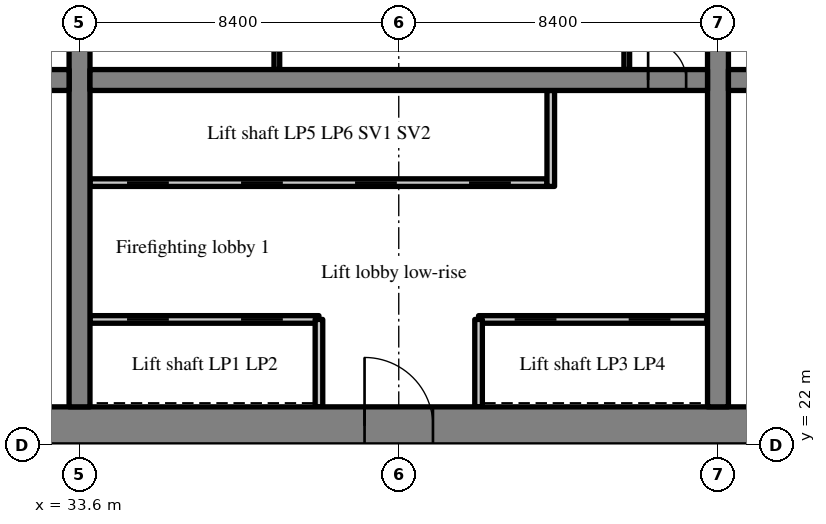
"""IFC4 building model, lengths in metres.
Left out: names, types, materials, properties, quantities, classifications, styles, units other than length and angle.
Written with IfcOpenShell. Run it as: python <this file> out.ifc"""

import sys

from ifc_helpers import new_model, si_unit, direction, frame, frame_2d, origin, place, context, subcontext, project, spatial, rectangle, extrude, source, transform, mapped, element, fill, save


model = new_model("IFC4")
c1 = context("Model", 3, precision=1e-05, world=origin(), true_north=direction((0.0, 1.0)))
c2 = subcontext(c1, "Body", "Model", "MODEL_VIEW")
j1 = project(units=[si_unit("LENGTHUNIT", "METRE"), si_unit("PLANEANGLEUNIT", "RADIAN")], contexts=[c1])
p1 = place(None, origin())
s1 = spatial("IfcSite", under=j1, at=p1, CompositionType="ELEMENT")
p2 = place(p1, origin())
s2 = spatial("IfcBuilding", under=s1, at=p2, CompositionType="ELEMENT")
p3 = place(p2, frame((0.0, 0.0, 58.2)))
s3 = spatial("IfcBuildingStorey", under=s2, at=p3, CompositionType="ELEMENT", Elevation=58.2)
m1 = source(origin(), c2, "Body", "SweptSolid", [
    extrude(rectangle(XDim=50.4, YDim=1.0, at=frame_2d((25.2, 0.0))), origin(), (0.0, 0.0, 1.0), 3.52),
])
p4 = place(p3, frame((25.2, 22.5, 0.0), z_axis=(0.0, 0.0, 1.0), x_axis=(1.0, 0.0, 0.0)))
e1 = element("IfcWall", 1, at=p4, inside=s3, PredefinedType="SHEAR", context=c2, shape_type="MappedRepresentation", body=[
    mapped(m1, transform((0.0, 0.0, 0.0), scale=1.0)),
])
m2 = source(origin(), c2, "Body", "SweptSolid", [
    extrude(rectangle(XDim=1.8, YDim=2.1, at=frame_2d((0.9, 1.05))), frame((0.0, 0.51, 0.0), z_axis=(0.0, -1.0, 0.0), x_axis=(1.0, 0.0, 0.0)), (0.0, 0.0, 1.0), 1.02),
])
p5 = place(p4, frame((15.9, 0.0, 0.0)))
e2 = element("IfcOpeningElement", 2, at=p5, cuts=e1, PredefinedType="OPENING", context=c2, shape_type="MappedRepresentation", body=[
    mapped(m2, transform((0.0, 0.0, 0.0), scale=1.0)),
])
m3 = source(origin(), c2, "Body", "SweptSolid", [
    extrude(rectangle(XDim=1.2, YDim=2.1, at=frame_2d((0.6, 1.05))), frame((0.0, 0.51, 0.0), z_axis=(0.0, -1.0, 0.0), x_axis=(1.0, 0.0, 0.0)), (0.0, 0.0, 1.0), 1.02),
])
p6 = place(p4, frame((26.987, 0.0, 0.0)))
e3 = element("IfcOpeningElement", 3, at=p6, cuts=e1, PredefinedType="OPENING", context=c2, shape_type="MappedRepresentation", body=[
    mapped(m3, transform((0.0, 0.0, 0.0), scale=1.0)),
])
m4 = source(origin(), c2, "Body", "SweptSolid", [
    extrude(rectangle(XDim=0.9, YDim=2.1, at=frame_2d((0.45, 1.05))), frame((0.0, 0.51, 0.0), z_axis=(0.0, -1.0, 0.0), x_axis=(1.0, 0.0, 0.0)), (0.0, 0.0, 1.0), 1.02),
])
p7 = place(p4, frame((34.5, 0.0, 0.0)))
e4 = element("IfcOpeningElement", 4, at=p7, cuts=e1, PredefinedType="OPENING", context=c2, shape_type="MappedRepresentation", body=[
    mapped(m4, transform((0.0, 0.0, 0.0), scale=1.0)),
])
p8 = place(p4, frame((31.5, 0.0, 0.0)))
e5 = element("IfcOpeningElement", 5, at=p8, cuts=e1, PredefinedType="OPENING", context=c2, shape_type="MappedRepresentation", body=[
    mapped(m4, transform((0.0, 0.0, 0.0), scale=1.0)),
])
p9 = place(p4, frame((39.769, 0.0, 0.0)))
e6 = element("IfcOpeningElement", 6, at=p9, cuts=e1, PredefinedType="OPENING", context=c2, shape_type="MappedRepresentation", body=[
    mapped(m4, transform((0.0, 0.0, 0.0), scale=1.0)),
])
p10 = place(p4, frame((36.756, 0.0, 0.0)))
e7 = element("IfcOpeningElement", 7, at=p10, cuts=e1, PredefinedType="OPENING", context=c2, shape_type="MappedRepresentation", body=[
    mapped(m4, transform((0.0, 0.0, 0.0), scale=1.0)),
])
p11 = place(p4, frame((6.438, 0.0, 0.0)))
e8 = element("IfcOpeningElement", 8, at=p11, cuts=e1, PredefinedType="OPENING", context=c2, shape_type="MappedRepresentation", body=[
    mapped(m3, transform((0.0, 0.0, 0.0), scale=1.0)),
])
p12 = place(p4, frame((47.725, 0.0, 0.0)))
e9 = element("IfcOpeningElement", 9, at=p12, cuts=e1, PredefinedType="OPENING", context=c2, shape_type="MappedRepresentation", body=[
    mapped(m3, transform((0.0, 0.0, 0.0), scale=1.0)),
])
m5 = source(origin(), c2, "Body", "SweptSolid", [
    extrude(rectangle(XDim=18.0, YDim=0.55, at=frame_2d((9.0, 0.0))), origin(), (0.0, 0.0, 1.0), 3.52),
])
p13 = place(p3, frame((33.6, 23.0, 0.0), z_axis=(0.0, 0.0, 1.0), x_axis=(0.0, 1.0, 0.0)))
e10 = element("IfcWall", 10, at=p13, inside=s3, PredefinedType="SHEAR", context=c2, shape_type="MappedRepresentation", body=[
    mapped(m5, transform((0.0, 0.0, 0.0), scale=1.0)),
])
m6 = source(origin(), c2, "Body", "SweptSolid", [
    extrude(rectangle(XDim=1.1, YDim=2.1, at=frame_2d((0.55, 1.05))), frame((0.0, 0.285, 0.0), z_axis=(0.0, -1.0, 0.0), x_axis=(1.0, 0.0, 0.0)), (0.0, 0.0, 1.0), 0.57),
])
p14 = place(p13, frame((12.45, 0.0, 0.0)))
e11 = element("IfcOpeningElement", 11, at=p14, cuts=e10, PredefinedType="OPENING", context=c2, shape_type="MappedRepresentation", body=[
    mapped(m6, transform((0.0, 0.0, 0.0), scale=1.0)),
])
p15 = place(p3, frame((50.4, 23.0, 0.0), z_axis=(0.0, 0.0, 1.0), x_axis=(0.0, 1.0, 0.0)))
e12 = element("IfcWall", 12, at=p15, inside=s3, PredefinedType="SHEAR", context=c2, shape_type="MappedRepresentation", body=[
    mapped(m5, transform((0.0, 0.0, 0.0), scale=1.0)),
])
p16 = place(p15, frame((12.45, 0.0, 0.0)))
e13 = element("IfcOpeningElement", 13, at=p16, cuts=e12, PredefinedType="OPENING", context=c2, shape_type="MappedRepresentation", body=[
    mapped(m6, transform((0.0, 0.0, 0.0), scale=1.0)),
])
m7 = source(origin(), c2, "Body", "SweptSolid", [
    extrude(rectangle(XDim=7.125, YDim=0.55, at=frame_2d((3.562, 0.0))), origin(), (0.0, 0.0, 1.0), 3.52),
])
p17 = place(p3, frame((26.2, 31.6, 0.0), z_axis=(0.0, 0.0, 1.0), x_axis=(1.0, 0.0, 0.0)))
e14 = element("IfcWall", 14, at=p17, inside=s3, PredefinedType="SHEAR", context=c2, shape_type="MappedRepresentation", body=[
    mapped(m7, transform((0.0, 0.0, 0.0), scale=1.0)),
])
p18 = place(p17, frame((5.488, 0.0, 0.0)))
e15 = element("IfcOpeningElement", 15, at=p18, cuts=e14, PredefinedType="OPENING", context=c2, shape_type="MappedRepresentation", body=[
    mapped(m6, transform((0.0, 0.0, 0.0), scale=1.0)),
])
m8 = source(origin(), c2, "Body", "SweptSolid", [
    extrude(rectangle(XDim=16.25, YDim=0.55, at=frame_2d((8.125, 0.0))), origin(), (0.0, 0.0, 1.0), 3.52),
])
p19 = place(p3, frame((33.875, 31.6, 0.0), z_axis=(0.0, 0.0, 1.0), x_axis=(1.0, 0.0, 0.0)))
e16 = element("IfcWall", 16, at=p19, inside=s3, PredefinedType="SHEAR", context=c2, shape_type="MappedRepresentation", body=[
    mapped(m8, transform((0.0, 0.0, 0.0), scale=1.0)),
])
m9 = source(origin(), c2, "Body", "SweptSolid", [
    extrude(rectangle(XDim=1.0, YDim=2.1, at=frame_2d((0.5, 1.05))), frame((0.0, 0.285, 0.0), z_axis=(0.0, -1.0, 0.0), x_axis=(1.0, 0.0, 0.0)), (0.0, 0.0, 1.0), 0.57),
])
p20 = place(p19, frame((14.687, 0.0, 0.0)))
e17 = element("IfcOpeningElement", 17, at=p20, cuts=e16, PredefinedType="OPENING", context=c2, shape_type="MappedRepresentation", body=[
    mapped(m9, transform((0.0, 0.0, 0.0), scale=1.0)),
])
p21 = place(p3, frame((50.675, 31.6, 0.0), z_axis=(0.0, 0.0, 1.0), x_axis=(1.0, 0.0, 0.0)))
e18 = element("IfcWall", 18, at=p21, inside=s3, PredefinedType="SHEAR", context=c2, shape_type="MappedRepresentation", body=[
    mapped(m8, transform((0.0, 0.0, 0.0), scale=1.0)),
])
p22 = place(p21, frame((0.562, 0.0, 0.0)))
e19 = element("IfcOpeningElement", 19, at=p22, cuts=e18, PredefinedType="OPENING", context=c2, shape_type="MappedRepresentation", body=[
    mapped(m9, transform((0.0, 0.0, 0.0), scale=1.0)),
])
m10 = source(origin(), c2, "Body", "SweptSolid", [
    extrude(rectangle(XDim=6.025, YDim=0.2, at=frame_2d((3.012, 0.0))), origin(), (0.0, 0.0, 1.0), 3.52),
])
p23 = place(p3, frame((33.875, 25.3, 0.0), z_axis=(0.0, 0.0, 1.0), x_axis=(1.0, 0.0, 0.0)))
e20 = element("IfcWall", 20, at=p23, inside=s3, PredefinedType="SOLIDWALL", context=c2, shape_type="MappedRepresentation", body=[
    mapped(m10, transform((0.0, 0.0, 0.0), scale=1.0)),
])
m11 = source(origin(), c2, "Body", "SweptSolid", [
    extrude(rectangle(XDim=1.1, YDim=2.1, at=frame_2d((0.55, 1.05))), frame((0.0, 0.11, 0.0), z_axis=(0.0, -1.0, 0.0), x_axis=(1.0, 0.0, 0.0)), (0.0, 0.0, 1.0), 0.22),
])
p24 = place(p23, frame((0.975, 0.0, 0.0)))
e21 = element("IfcOpeningElement", 21, at=p24, cuts=e20, PredefinedType="OPENING", context=c2, shape_type="MappedRepresentation", body=[
    mapped(m11, transform((0.0, 0.0, 0.0), scale=1.0)),
])
p25 = place(p23, frame((3.975, 0.0, 0.0)))
e22 = element("IfcOpeningElement", 22, at=p25, cuts=e20, PredefinedType="OPENING", context=c2, shape_type="MappedRepresentation", body=[
    mapped(m11, transform((0.0, 0.0, 0.0), scale=1.0)),
])
m12 = source(origin(), c2, "Body", "SweptSolid", [
    extrude(rectangle(XDim=6.0, YDim=0.2, at=frame_2d((3.0, 0.0))), origin(), (0.0, 0.0, 1.0), 3.52),
])
p26 = place(p3, frame((44.1, 25.3, 0.0), z_axis=(0.0, 0.0, 1.0), x_axis=(1.0, 0.0, 0.0)))
e23 = element("IfcWall", 23, at=p26, inside=s3, PredefinedType="SOLIDWALL", context=c2, shape_type="MappedRepresentation", body=[
    mapped(m12, transform((0.0, 0.0, 0.0), scale=1.0)),
])
p27 = place(p26, frame((0.95, 0.0, 0.0)))
e24 = element("IfcOpeningElement", 24, at=p27, cuts=e23, PredefinedType="OPENING", context=c2, shape_type="MappedRepresentation", body=[
    mapped(m11, transform((0.0, 0.0, 0.0), scale=1.0)),
])
p28 = place(p26, frame((3.95, 0.0, 0.0)))
e25 = element("IfcOpeningElement", 25, at=p28, cuts=e23, PredefinedType="OPENING", context=c2, shape_type="MappedRepresentation", body=[
    mapped(m11, transform((0.0, 0.0, 0.0), scale=1.0)),
])
m13 = source(origin(), c2, "Body", "SweptSolid", [
    extrude(rectangle(XDim=12.025, YDim=0.2, at=frame_2d((6.012, 0.0))), origin(), (0.0, 0.0, 1.0), 3.52),
])
p29 = place(p3, frame((33.875, 28.9, 0.0), z_axis=(0.0, 0.0, 1.0), x_axis=(1.0, 0.0, 0.0)))
e26 = element("IfcWall", 26, at=p29, inside=s3, PredefinedType="SOLIDWALL", context=c2, shape_type="MappedRepresentation", body=[
    mapped(m13, transform((0.0, 0.0, 0.0), scale=1.0)),
])
p30 = place(p29, frame((0.975, 0.0, 0.0)))
e27 = element("IfcOpeningElement", 27, at=p30, cuts=e26, PredefinedType="OPENING", context=c2, shape_type="MappedRepresentation", body=[
    mapped(m11, transform((0.0, 0.0, 0.0), scale=1.0)),
])
p31 = place(p29, frame((3.975, 0.0, 0.0)))
e28 = element("IfcOpeningElement", 28, at=p31, cuts=e26, PredefinedType="OPENING", context=c2, shape_type="MappedRepresentation", body=[
    mapped(m11, transform((0.0, 0.0, 0.0), scale=1.0)),
])
p32 = place(p29, frame((6.975, 0.0, 0.0)))
e29 = element("IfcOpeningElement", 29, at=p32, cuts=e26, PredefinedType="OPENING", context=c2, shape_type="MappedRepresentation", body=[
    mapped(m11, transform((0.0, 0.0, 0.0), scale=1.0)),
])
p33 = place(p29, frame((9.975, 0.0, 0.0)))
e30 = element("IfcOpeningElement", 30, at=p33, cuts=e26, PredefinedType="OPENING", context=c2, shape_type="MappedRepresentation", body=[
    mapped(m11, transform((0.0, 0.0, 0.0), scale=1.0)),
])
m14 = source(origin(), c2, "Body", "SweptSolid", [
    extrude(rectangle(XDim=2.3, YDim=0.2, at=frame_2d((1.15, 0.0))), origin(), (0.0, 0.0, 1.0), 3.52),
])
for number, where, z_axis, x_axis in (
    (31, (39.9, 23.0, 0.0), (0.0, 0.0, 1.0), (0.0, 1.0, 0.0)),
    (32, (44.1, 23.0, 0.0), (0.0, 0.0, 1.0), (0.0, 1.0, 0.0)),
):
    element("IfcWall", number, at=place(p3, frame(where, z_axis=z_axis, x_axis=x_axis)), inside=s3, PredefinedType="SOLIDWALL", context=c2, shape_type="MappedRepresentation", body=[
        mapped(m14, transform((0.0, 0.0, 0.0), scale=1.0)),
    ])
m15 = source(origin(), c2, "Body", "SweptSolid", [
    extrude(rectangle(XDim=2.525, YDim=0.2, at=frame_2d((1.262, 0.0))), origin(), (0.0, 0.0, 1.0), 3.52),
])
p34 = place(p3, frame((46.0, 28.8, 0.0), z_axis=(0.0, 0.0, 1.0), x_axis=(0.0, 1.0, 0.0)))
e33 = element("IfcWall", 33, at=p34, inside=s3, PredefinedType="SOLIDWALL", context=c2, shape_type="MappedRepresentation", body=[
    mapped(m15, transform((0.0, 0.0, 0.0), scale=1.0)),
])
m16 = source(origin(), c2, "Body", "SweptSolid", [
    extrude(rectangle(XDim=3.125, YDim=0.15, at=frame_2d((1.562, 0.0))), origin(), (0.0, 0.0, 1.0), 3.52),
])
for number, where, z_axis, x_axis in (
    (34, (48.0, 31.875, 0.0), (0.0, 0.0, 1.0), (0.0, 1.0, 0.0)),
    (35, (38.792, 31.875, 0.0), (0.0, 0.0, 1.0), (0.0, 1.0, 0.0)),
):
    element("IfcWall", number, at=place(p3, frame(where, z_axis=z_axis, x_axis=x_axis)), inside=s3, PredefinedType="PARTITIONING", context=c2, shape_type="MappedRepresentation", body=[
        mapped(m16, transform((0.0, 0.0, 0.0), scale=1.0)),
    ])
m17 = source(origin(), c2, "Body", "SweptSolid", [
    extrude(rectangle(XDim=1.8, YDim=2.1, at=frame_2d((0.9, 1.05))), frame((0.0, 0.375, 0.0), z_axis=(0.0, -1.0, 0.0), x_axis=(1.0, 0.0, 0.0)), (0.0, 0.0, 1.0), 0.05),
])
p35 = place(p5, origin())
e36 = element("IfcDoor", 36, at=p35, inside=s3, OperationType="DOUBLE_DOOR_SINGLE_SWING", PredefinedType="DOOR", context=c2, shape_type="MappedRepresentation", body=[
    mapped(m17, transform((0.0, 0.0, 0.0), scale=1.0)),
])
fill(e2, e36)
m18 = source(origin(), c2, "Body", "SweptSolid", [
    extrude(rectangle(XDim=1.0, YDim=2.1, at=frame_2d((0.5, 1.05))), frame((0.0, 0.025, 0.0), z_axis=(0.0, -1.0, 0.0), x_axis=(1.0, 0.0, 0.0)), (0.0, 0.0, 1.0), 0.05),
])
p36 = place(p20, origin())
e37 = element("IfcDoor", 37, at=p36, inside=s3, OperationType="SINGLE_SWING_LEFT", PredefinedType="DOOR", context=c2, shape_type="MappedRepresentation", body=[
    mapped(m18, transform((0.0, 0.0, 0.0), scale=1.0)),
])
fill(e17, e37)
m19 = source(origin(), c2, "Body", "SweptSolid", [
    extrude(rectangle(XDim=1.1, YDim=2.1, at=frame_2d((0.55, 1.05))), frame((0.0, 0.025, 0.0), z_axis=(0.0, -1.0, 0.0), x_axis=(1.0, 0.0, 0.0)), (0.0, 0.0, 1.0), 0.05),
])
p37 = place(p24, origin())
e38 = element("IfcDoor", 38, at=p37, inside=s3, OperationType="SLIDING_TO_LEFT", PredefinedType="DOOR", context=c2, shape_type="MappedRepresentation", body=[
    mapped(m19, transform((0.0, 0.0, 0.0), scale=1.0)),
])
fill(e21, e38)
p38 = place(p25, origin())
e39 = element("IfcDoor", 39, at=p38, inside=s3, OperationType="SLIDING_TO_RIGHT", PredefinedType="DOOR", context=c2, shape_type="MappedRepresentation", body=[
    mapped(m19, transform((0.0, 0.0, 0.0), scale=1.0)),
])
fill(e22, e39)
p39 = place(p27, origin())
e40 = element("IfcDoor", 40, at=p39, inside=s3, OperationType="SLIDING_TO_LEFT", PredefinedType="DOOR", context=c2, shape_type="MappedRepresentation", body=[
    mapped(m19, transform((0.0, 0.0, 0.0), scale=1.0)),
])
fill(e24, e40)
p40 = place(p28, origin())
e41 = element("IfcDoor", 41, at=p40, inside=s3, OperationType="SLIDING_TO_RIGHT", PredefinedType="DOOR", context=c2, shape_type="MappedRepresentation", body=[
    mapped(m19, transform((0.0, 0.0, 0.0), scale=1.0)),
])
fill(e25, e41)
p41 = place(p30, origin())
e42 = element("IfcDoor", 42, at=p41, inside=s3, OperationType="SLIDING_TO_LEFT", PredefinedType="DOOR", context=c2, shape_type="MappedRepresentation", body=[
    mapped(m19, transform((0.0, 0.0, 0.0), scale=1.0)),
])
fill(e27, e42)
p42 = place(p31, origin())
e43 = element("IfcDoor", 43, at=p42, inside=s3, OperationType="SLIDING_TO_RIGHT", PredefinedType="DOOR", context=c2, shape_type="MappedRepresentation", body=[
    mapped(m19, transform((0.0, 0.0, 0.0), scale=1.0)),
])
fill(e28, e43)
p43 = place(p32, origin())
e44 = element("IfcDoor", 44, at=p43, inside=s3, OperationType="SLIDING_TO_LEFT", PredefinedType="DOOR", context=c2, shape_type="MappedRepresentation", body=[
    mapped(m19, transform((0.0, 0.0, 0.0), scale=1.0)),
])
fill(e29, e44)
p44 = place(p33, origin())
e45 = element("IfcDoor", 45, at=p44, inside=s3, OperationType="SLIDING_TO_RIGHT", PredefinedType="DOOR", context=c2, shape_type="MappedRepresentation", body=[
    mapped(m19, transform((0.0, 0.0, 0.0), scale=1.0)),
])
fill(e30, e45)
save(model, sys.argv[1])
